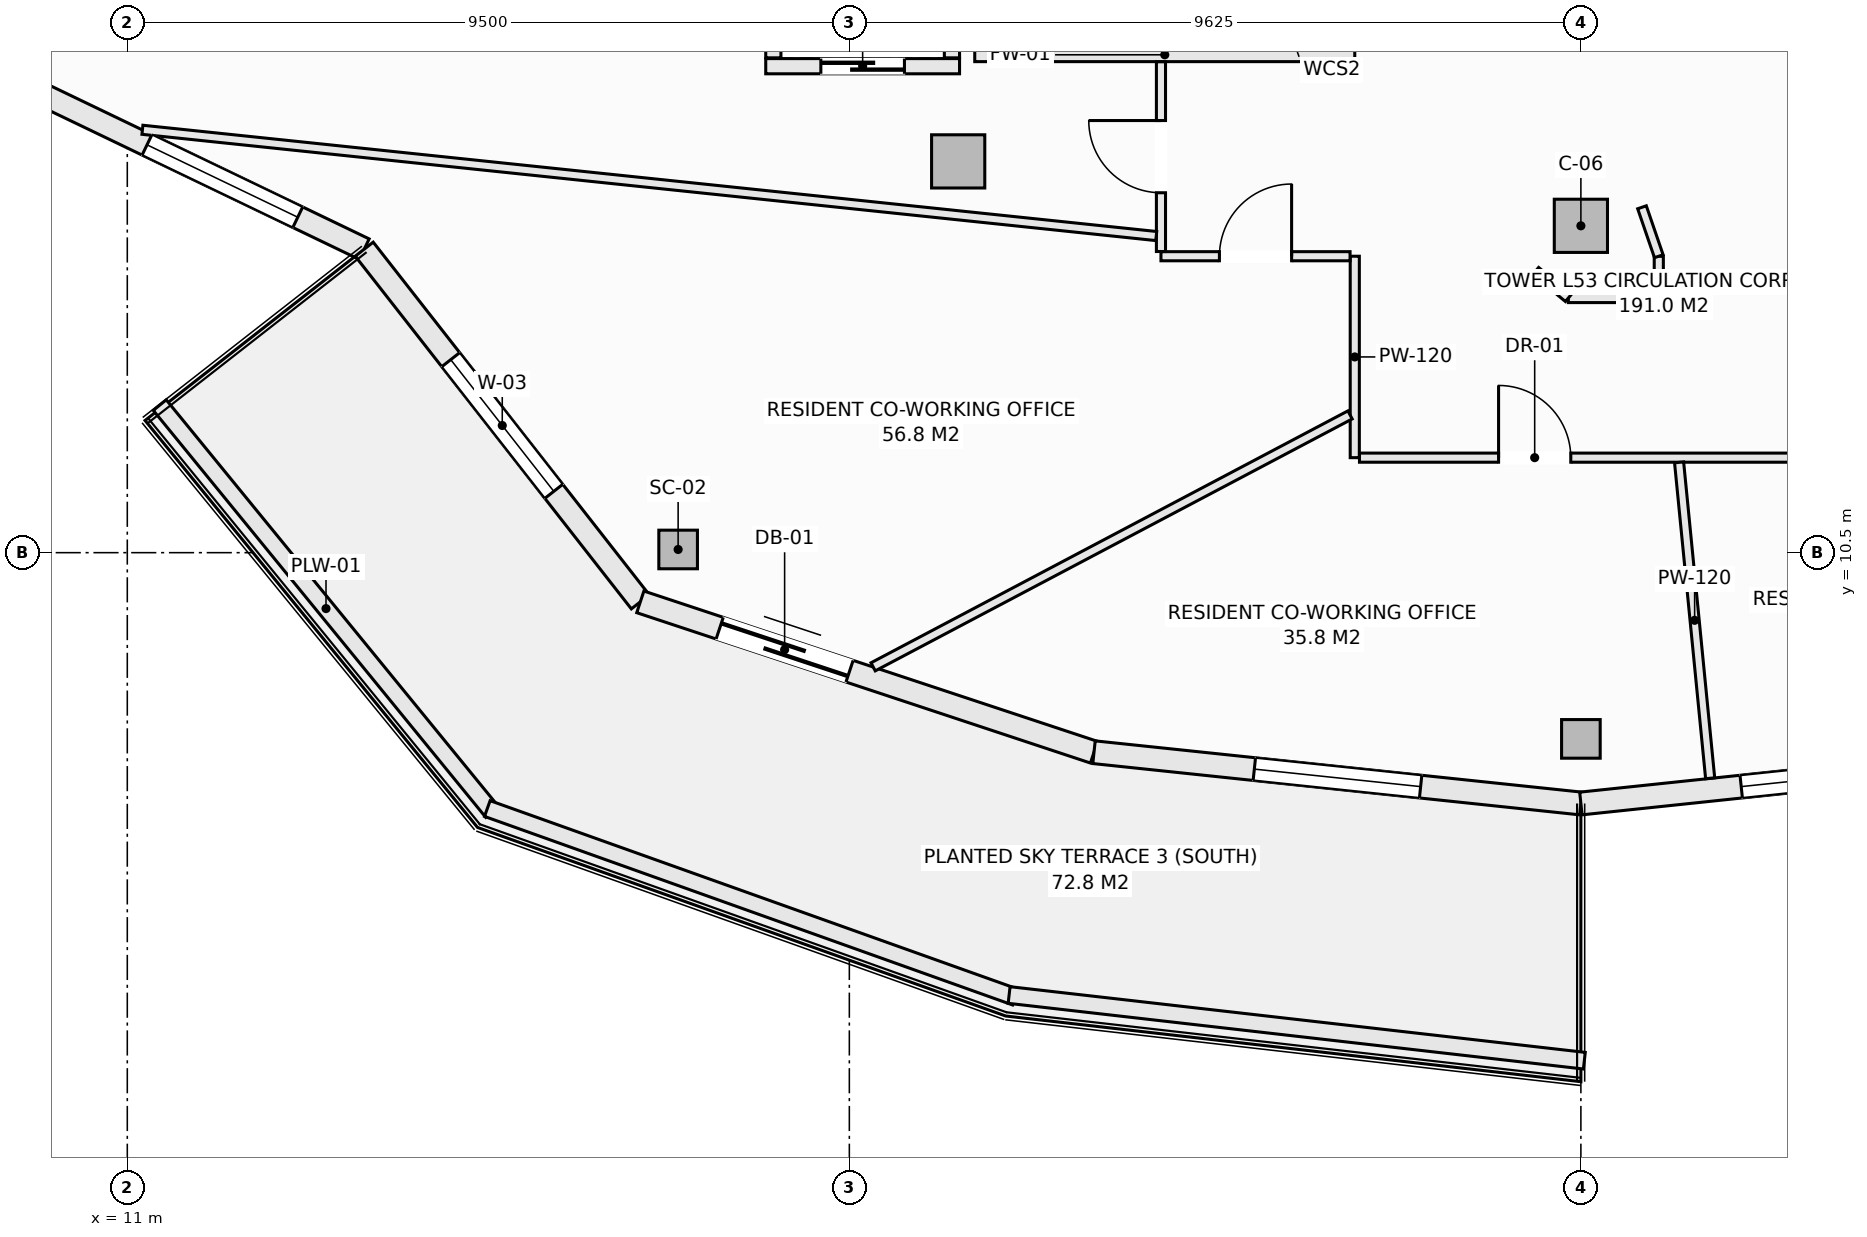
"""IFC4 building model, lengths in metres.
Left out: names, types, materials, properties, quantities, classifications, styles, units other than length and angle.
Written with IfcOpenShell. Run it as: python <this file> out.ifc"""

import sys

from ifc_helpers import new_model, si_unit, direction, frame, frame_2d, origin, origin_2d, place, context, subcontext, project, spatial, rectangle, hollow_rectangle, extrude, element, fill, save


model = new_model("IFC4")
c1 = context("Model", 3, precision=1e-05, world=origin(), true_north=direction((0.0, 1.0)))
c2 = subcontext(c1, "Body", "Model", "MODEL_VIEW")
j1 = project(units=[si_unit("LENGTHUNIT", "METRE"), si_unit("PLANEANGLEUNIT", "RADIAN")], contexts=[c1])
p1 = place(None, origin())
s1 = spatial("IfcSite", under=j1, at=p1, CompositionType="ELEMENT")
p2 = place(p1, origin())
s2 = spatial("IfcBuilding", under=s1, at=p2, CompositionType="ELEMENT")
p3 = place(p2, frame((0.0, 0.0, 203.0)))
s3 = spatial("IfcBuildingStorey", under=s2, at=p3, CompositionType="ELEMENT", Elevation=203.0)
for number, where, z_axis, x_axis in (
    (1, (18.247, 10.542, -0.27), (0.0, 0.0, 1.0), (1.0, 0.0, 0.0)),
    (2, (30.125, 8.05, -0.27), (0.0, 0.0, 1.0), (1.0, 0.0, 0.0)),
):
    element("IfcColumn", number, at=place(p3, frame(where, z_axis=z_axis, x_axis=x_axis)), inside=s3, PredefinedType="COLUMN", context=c2, shape_type="SweptSolid", body=[
        extrude(hollow_rectangle(XDim=0.508, YDim=0.508, WallThickness=0.019, at=origin_2d()), origin(), (0.0, 0.0, 1.0), 3.3),
    ])
for number, where, z_axis, x_axis in (
    (3, (21.932, 15.648, -0.27), (0.0, 0.0, 1.0), (1.0, 0.0, 0.0)),
    (4, (30.125, 14.8, -0.27), (0.0, 0.0, 1.0), (1.0, 0.0, 0.0)),
):
    element("IfcColumn", number, at=place(p3, frame(where, z_axis=z_axis, x_axis=x_axis)), inside=s3, PredefinedType="COLUMN", context=c2, shape_type="SweptSolid", body=[
        extrude(rectangle(XDim=0.7, YDim=0.7, at=origin_2d()), origin(), (0.0, 0.0, 1.0), 3.3),
    ])
p4 = place(p3, frame((8.691, 17.1, 0.0), z_axis=(0.0, 0.0, 1.0), x_axis=(0.901348331142, -0.433094892545, 0.0)))
e5 = element("IfcWall", 5, at=p4, inside=s3, PredefinedType="SOLIDWALL", context=c2, shape_type="SweptSolid", body=[
    extrude(rectangle(XDim=6.021, YDim=0.3, at=frame_2d((3.01, 0.0))), origin(), (0.0, 0.0, 1.0), 2.605),
])
p5 = place(p4, frame((2.85, 0.0, 0.72)))
e6 = element("IfcOpeningElement", 6, at=p5, cuts=e5, PredefinedType="OPENING", context=c2, shape_type="SweptSolid", body=[
    extrude(rectangle(XDim=2.2, YDim=1.65, at=frame_2d((1.1, 0.825))), frame((0.0, 0.16, 0.0), z_axis=(0.0, -1.0, 0.0), x_axis=(1.0, 0.0, 0.0)), (0.0, 0.0, 1.0), 0.32),
])
p6 = place(p3, frame((14.117, 14.493, 0.0), z_axis=(0.0, 0.0, 1.0), x_axis=(0.616450126935, -0.787393955401, 0.0)))
e7 = element("IfcWall", 7, at=p6, inside=s3, PredefinedType="SOLIDWALL", context=c2, shape_type="SweptSolid", body=[
    extrude(rectangle(XDim=5.893, YDim=0.3, at=frame_2d((2.946, 0.0))), origin(), (0.0, 0.0, 1.0), 2.605),
])
p7 = place(p6, frame((1.846, 0.0, 0.72)))
e8 = element("IfcOpeningElement", 8, at=p7, cuts=e7, PredefinedType="OPENING", context=c2, shape_type="SweptSolid", body=[
    extrude(rectangle(XDim=2.2, YDim=1.65, at=frame_2d((1.1, 0.825))), frame((0.0, 0.16, 0.0), z_axis=(0.0, -1.0, 0.0), x_axis=(1.0, 0.0, 0.0)), (0.0, 0.0, 1.0), 0.32),
])
p8 = place(p3, frame((17.75, 9.853, 0.0), z_axis=(0.0, 0.0, 1.0), x_axis=(0.949240877604, -0.314550085495, 0.0)))
e9 = element("IfcWall", 9, at=p8, inside=s3, PredefinedType="SOLIDWALL", context=c2, shape_type="SweptSolid", body=[
    extrude(rectangle(XDim=6.288, YDim=0.3, at=frame_2d((3.144, 0.0))), origin(), (0.0, 0.0, 1.0), 2.605),
])
p9 = place(p8, frame((1.1, 0.0, 0.0)))
e10 = element("IfcOpeningElement", 10, at=p9, cuts=e9, PredefinedType="OPENING", context=c2, shape_type="SweptSolid", body=[
    extrude(rectangle(XDim=1.8, YDim=2.25, at=frame_2d((0.9, 1.125))), frame((0.0, 0.16, 0.0), z_axis=(0.0, -1.0, 0.0), x_axis=(1.0, 0.0, 0.0)), (0.0, 0.0, 1.0), 0.32),
])
p10 = place(p3, frame((23.719, 7.875, 0.0), z_axis=(0.0, 0.0, 1.0), x_axis=(0.994497142298, -0.104763705363, 0.0)))
e11 = element("IfcWall", 11, at=p10, inside=s3, PredefinedType="SOLIDWALL", context=c2, shape_type="SweptSolid", body=[
    extrude(rectangle(XDim=6.441, YDim=0.3, at=frame_2d((3.221, 0.0))), origin(), (0.0, 0.0, 1.0), 2.605),
])
p11 = place(p10, frame((2.121, 0.0, 0.72)))
e12 = element("IfcOpeningElement", 12, at=p11, cuts=e11, PredefinedType="OPENING", context=c2, shape_type="SweptSolid", body=[
    extrude(rectangle(XDim=2.2, YDim=1.65, at=frame_2d((1.1, 0.825))), frame((0.0, 0.16, 0.0), z_axis=(0.0, -1.0, 0.0), x_axis=(1.0, 0.0, 0.0)), (0.0, 0.0, 1.0), 0.32),
])
p12 = place(p3, frame((30.125, 7.2, 0.0), z_axis=(0.0, 0.0, 1.0), x_axis=(0.994497142298, 0.104763705363, 0.0)))
e13 = element("IfcWall", 13, at=p12, inside=s3, PredefinedType="SOLIDWALL", context=c2, shape_type="SweptSolid", body=[
    extrude(rectangle(XDim=6.441, YDim=0.3, at=frame_2d((3.221, 0.0))), origin(), (0.0, 0.0, 1.0), 2.605),
])
p13 = place(p12, frame((2.121, 0.0, 0.72)))
e14 = element("IfcOpeningElement", 14, at=p13, cuts=e13, PredefinedType="OPENING", context=c2, shape_type="SweptSolid", body=[
    extrude(rectangle(XDim=2.2, YDim=1.65, at=frame_2d((1.1, 0.825))), frame((0.0, 0.16, 0.0), z_axis=(0.0, -1.0, 0.0), x_axis=(1.0, 0.0, 0.0)), (0.0, 0.0, 1.0), 0.32),
])
p14 = place(p3, frame((11.427, 12.441, 0.0), z_axis=(0.0, 0.0, 1.0), x_axis=(0.632697312147, -0.774399193699, 0.0)))
e15 = element("IfcWall", 15, at=p14, inside=s3, PredefinedType="PARAPET", context=c2, shape_type="SweptSolid", body=[
    extrude(rectangle(XDim=6.914, YDim=0.22, at=frame_2d((3.457, 0.0))), origin(), (0.0, 0.0, 1.0), 0.52),
])
p15 = place(p3, frame((15.737, 7.134, 0.0), z_axis=(0.0, 0.0, 1.0), x_axis=(0.941780086523, -0.336229488042, 0.0)))
e16 = element("IfcWall", 16, at=p15, inside=s3, PredefinedType="PARAPET", context=c2, shape_type="SweptSolid", body=[
    extrude(rectangle(XDim=7.378, YDim=0.22, at=frame_2d((3.689, 0.0))), origin(), (0.0, 0.0, 1.0), 0.52),
])
p16 = place(p3, frame((22.602, 4.68, 0.0), z_axis=(0.0, 0.0, 1.0), x_axis=(0.993546198781, -0.113428175021, 0.0)))
e17 = element("IfcWall", 17, at=p16, inside=s3, PredefinedType="PARAPET", context=c2, shape_type="SweptSolid", body=[
    extrude(rectangle(XDim=7.617, YDim=0.22, at=frame_2d((3.809, 0.0))), origin(), (0.0, 0.0, 1.0), 0.52),
])
p17 = place(p3, frame((19.4, 16.9, 0.0), z_axis=(0.0, 0.0, 1.0), x_axis=(1.0, 0.0, 0.0)))
e18 = element("IfcWall", 18, at=p17, inside=s3, PredefinedType="SOLIDWALL", context=c2, shape_type="SweptSolid", body=[
    extrude(rectangle(XDim=2.55, YDim=0.2, at=frame_2d((1.275, 0.0))), origin(), (0.0, 0.0, 1.0), 3.03),
])
p18 = place(p17, frame((0.725, 0.0, 0.0)))
e19 = element("IfcOpeningElement", 19, at=p18, cuts=e18, PredefinedType="OPENING", context=c2, shape_type="SweptSolid", body=[
    extrude(rectangle(XDim=1.1, YDim=2.2, at=frame_2d((0.55, 1.1))), frame((0.0, 0.11, 0.0), z_axis=(0.0, -1.0, 0.0), x_axis=(1.0, 0.0, 0.0)), (0.0, 0.0, 1.0), 0.22),
])
for number, where, z_axis, x_axis in (
    (20, (19.5, 17.01, 0.0), (0.0, 0.0, 1.0), (0.0, 1.0, 0.0)),
    (21, (21.85, 17.01, 0.0), (0.0, 0.0, 1.0), (0.0, 1.0, 0.0)),
):
    element("IfcWall", number, at=place(p3, frame(where, z_axis=z_axis, x_axis=x_axis)), inside=s3, PredefinedType="SOLIDWALL", context=c2, shape_type="SweptSolid", body=[
        extrude(rectangle(XDim=2.53, YDim=0.2, at=frame_2d((1.265, 0.0))), origin(), (0.0, 0.0, 1.0), 3.03),
    ])
p19 = place(p3, frame((22.15, 17.05, 0.0), z_axis=(0.0, 0.0, 1.0), x_axis=(1.0, 0.0, 0.0)))
e22 = element("IfcWall", 22, at=p19, inside=s3, PredefinedType="SOLIDWALL", context=c2, shape_type="SweptSolid", body=[
    extrude(rectangle(XDim=5.0, YDim=0.18, at=frame_2d((2.5, 0.0))), origin(), (0.0, 0.0, 1.0), 3.03),
])
p20 = place(p3, frame((27.15, 11.75, 0.0), z_axis=(0.0, 0.0, 1.0), x_axis=(0.0, 1.0, 0.0)))
e23 = element("IfcWall", 23, at=p20, inside=s3, PredefinedType="PARTITIONING", context=c2, shape_type="SweptSolid", body=[
    extrude(rectangle(XDim=2.65, YDim=0.12, at=frame_2d((1.325, 0.0))), origin(), (0.0, 0.0, 1.0), 3.03),
])
p21 = place(p3, frame((24.6, 14.4, 0.0), z_axis=(0.0, 0.0, 1.0), x_axis=(1.0, 0.0, 0.0)))
e24 = element("IfcWall", 24, at=p21, inside=s3, PredefinedType="PARTITIONING", context=c2, shape_type="SweptSolid", body=[
    extrude(rectangle(XDim=2.488, YDim=0.12, at=frame_2d((1.244, 0.0))), origin(), (0.0, 0.0, 1.0), 3.03),
])
p22 = place(p21, frame((0.769, 0.0, 0.0)))
e25 = element("IfcOpeningElement", 25, at=p22, cuts=e24, PredefinedType="OPENING", context=c2, shape_type="SweptSolid", body=[
    extrude(rectangle(XDim=0.95, YDim=2.1, at=frame_2d((0.475, 1.05))), frame((0.0, 0.07, 0.0), z_axis=(0.0, -1.0, 0.0), x_axis=(1.0, 0.0, 0.0)), (0.0, 0.0, 1.0), 0.14),
])
p23 = place(p3, frame((27.212, 11.75, 0.0), z_axis=(0.0, 0.0, 1.0), x_axis=(1.0, 0.0, 0.0)))
e26 = element("IfcWall", 26, at=p23, inside=s3, PredefinedType="PARTITIONING", context=c2, shape_type="SweptSolid", body=[
    extrude(rectangle(XDim=8.676, YDim=0.12, at=frame_2d((4.338, 0.0))), origin(), (0.0, 0.0, 1.0), 3.03),
])
p24 = place(p23, frame((1.83, 0.0, 0.0)))
e27 = element("IfcOpeningElement", 27, at=p24, cuts=e26, PredefinedType="OPENING", context=c2, shape_type="SweptSolid", body=[
    extrude(rectangle(XDim=0.95, YDim=2.1, at=frame_2d((0.475, 1.05))), frame((0.0, 0.07, 0.0), z_axis=(0.0, -1.0, 0.0), x_axis=(1.0, 0.0, 0.0)), (0.0, 0.0, 1.0), 0.14),
])
p25 = place(p23, frame((5.757, 0.0, 0.0)))
e28 = element("IfcOpeningElement", 28, at=p25, cuts=e26, PredefinedType="OPENING", context=c2, shape_type="SweptSolid", body=[
    extrude(rectangle(XDim=0.95, YDim=2.1, at=frame_2d((0.475, 1.05))), frame((0.0, 0.07, 0.0), z_axis=(0.0, -1.0, 0.0), x_axis=(1.0, 0.0, 0.0)), (0.0, 0.0, 1.0), 0.14),
])
p26 = place(p3, frame((24.6, 14.462, 0.0), z_axis=(0.0, 0.0, 1.0), x_axis=(0.0, 1.0, 0.0)))
e29 = element("IfcWall", 29, at=p26, inside=s3, PredefinedType="PARTITIONING", context=c2, shape_type="SweptSolid", body=[
    extrude(rectangle(XDim=2.496, YDim=0.12, at=frame_2d((1.248, 0.0))), origin(), (0.0, 0.0, 1.0), 3.03),
])
p27 = place(p26, frame((0.773, 0.0, 0.0)))
e30 = element("IfcOpeningElement", 30, at=p27, cuts=e29, PredefinedType="OPENING", context=c2, shape_type="SweptSolid", body=[
    extrude(rectangle(XDim=0.95, YDim=2.1, at=frame_2d((0.475, 1.05))), frame((0.0, 0.07, 0.0), z_axis=(0.0, -1.0, 0.0), x_axis=(1.0, 0.0, 0.0)), (0.0, 0.0, 1.0), 0.14),
])
p28 = place(p3, frame((29.96, 13.85, 0.0), z_axis=(0.0, 0.0, 1.0), x_axis=(1.0, 0.0, 0.0)))
e31 = element("IfcWall", 31, at=p28, inside=s3, PredefinedType="PARTITIONING", context=c2, shape_type="SweptSolid", body=[
    extrude(rectangle(XDim=1.19, YDim=0.12, at=frame_2d((0.595, 0.0))), origin(), (0.0, 0.0, 1.0), 3.03),
])
p29 = place(p3, frame((31.15, 13.912, 0.0), z_axis=(0.0, 0.0, 1.0), x_axis=(0.0, 1.0, 0.0)))
e32 = element("IfcWall", 32, at=p29, inside=s3, PredefinedType="PARTITIONING", context=c2, shape_type="SweptSolid", body=[
    extrude(rectangle(XDim=0.488, YDim=0.12, at=frame_2d((0.244, 0.0))), origin(), (0.0, 0.0, 1.0), 3.03),
])
p30 = place(p3, frame((30.929, 15.044, 0.0), z_axis=(0.0, 0.0, 1.0), x_axis=(0.324498492416, -0.945886213252, 0.0)))
e33 = element("IfcWall", 33, at=p30, inside=s3, PredefinedType="PARTITIONING", context=c2, shape_type="SweptSolid", body=[
    extrude(rectangle(XDim=0.681, YDim=0.12, at=frame_2d((0.34, 0.0))), origin(), (0.0, 0.0, 1.0), 3.03),
])
p31 = place(p3, frame((29.531, 14.206, 0.0), z_axis=(0.0, 0.0, 1.0), x_axis=(0.7695479554, -0.638589026166, 0.0)))
e34 = element("IfcWall", 34, at=p31, inside=s3, PredefinedType="PARTITIONING", context=c2, shape_type="SweptSolid", body=[
    extrude(rectangle(XDim=0.557, YDim=0.12, at=frame_2d((0.279, 0.0))), origin(), (0.0, 0.0, 1.0), 3.03),
])
p32 = place(p3, frame((11.199, 16.063, 0.0), z_axis=(0.0, 0.0, 1.0), x_axis=(0.994553027345, -0.104231836785, 0.0)))
e35 = element("IfcWall", 35, at=p32, inside=s3, PredefinedType="PARTITIONING", context=c2, shape_type="SweptSolid", body=[
    extrude(rectangle(XDim=13.412, YDim=0.12, at=frame_2d((6.706, 0.0))), origin(), (0.0, 0.0, 1.0), 2.605),
])
p33 = place(p3, frame((20.813, 8.998, 0.0), z_axis=(0.0, 0.0, 1.0), x_axis=(0.884227698582, 0.467056074856, 0.0)))
e36 = element("IfcWall", 36, at=p33, inside=s3, PredefinedType="PARTITIONING", context=c2, shape_type="SweptSolid", body=[
    extrude(rectangle(XDim=7.096, YDim=0.12, at=frame_2d((3.548, 0.0))), origin(), (0.0, 0.0, 1.0), 3.03),
])
p34 = place(p3, frame((31.417, 11.688, 0.0), z_axis=(0.0, 0.0, 1.0), x_axis=(0.097923390467, -0.995193955769, 0.0)))
e37 = element("IfcWall", 37, at=p34, inside=s3, PredefinedType="PARTITIONING", context=c2, shape_type="SweptSolid", body=[
    extrude(rectangle(XDim=4.176, YDim=0.12, at=frame_2d((2.088, 0.0))), origin(), (0.0, 0.0, 1.0), 3.03),
])
p35 = place(p5, origin())
e38 = element("IfcWindow", 38, at=p35, inside=s3, PartitioningType="SINGLE_PANEL", PredefinedType="WINDOW", context=c2, shape_type="SweptSolid", body=[
    extrude(rectangle(XDim=2.2, YDim=1.65, at=frame_2d((1.1, 0.825))), frame((0.0, 0.03, 0.0), z_axis=(0.0, -1.0, 0.0), x_axis=(1.0, 0.0, 0.0)), (0.0, 0.0, 1.0), 0.06),
])
fill(e6, e38)
p36 = place(p7, origin())
e39 = element("IfcWindow", 39, at=p36, inside=s3, PartitioningType="SINGLE_PANEL", PredefinedType="WINDOW", context=c2, shape_type="SweptSolid", body=[
    extrude(rectangle(XDim=2.2, YDim=1.65, at=frame_2d((1.1, 0.825))), frame((0.0, 0.03, 0.0), z_axis=(0.0, -1.0, 0.0), x_axis=(1.0, 0.0, 0.0)), (0.0, 0.0, 1.0), 0.06),
])
fill(e8, e39)
p37 = place(p9, frame((1.8, 0.0, 0.0), z_axis=(0.0, 0.0, 1.0), x_axis=(-1.0, 0.0, 0.0)))
e40 = element("IfcDoor", 40, at=p37, inside=s3, OperationType="SLIDING_TO_LEFT", PredefinedType="DOOR", context=c2, shape_type="SweptSolid", body=[
    extrude(rectangle(XDim=1.8, YDim=2.25, at=frame_2d((0.9, 1.125))), frame((0.0, 0.025, 0.0), z_axis=(0.0, -1.0, 0.0), x_axis=(1.0, 0.0, 0.0)), (0.0, 0.0, 1.0), 0.05),
])
fill(e10, e40)
p38 = place(p11, origin())
e41 = element("IfcWindow", 41, at=p38, inside=s3, PartitioningType="SINGLE_PANEL", PredefinedType="WINDOW", context=c2, shape_type="SweptSolid", body=[
    extrude(rectangle(XDim=2.2, YDim=1.65, at=frame_2d((1.1, 0.825))), frame((0.0, 0.03, 0.0), z_axis=(0.0, -1.0, 0.0), x_axis=(1.0, 0.0, 0.0)), (0.0, 0.0, 1.0), 0.06),
])
fill(e12, e41)
p39 = place(p13, origin())
e42 = element("IfcWindow", 42, at=p39, inside=s3, PartitioningType="SINGLE_PANEL", PredefinedType="WINDOW", context=c2, shape_type="SweptSolid", body=[
    extrude(rectangle(XDim=2.2, YDim=1.65, at=frame_2d((1.1, 0.825))), frame((0.0, 0.03, 0.0), z_axis=(0.0, -1.0, 0.0), x_axis=(1.0, 0.0, 0.0)), (0.0, 0.0, 1.0), 0.06),
])
fill(e14, e42)
p40 = place(p18, origin())
e43 = element("IfcDoor", 43, at=p40, inside=s3, OperationType="SLIDING_TO_LEFT", PredefinedType="DOOR", context=c2, shape_type="SweptSolid", body=[
    extrude(rectangle(XDim=1.1, YDim=2.2, at=frame_2d((0.55, 1.1))), frame((0.0, 0.025, 0.0), z_axis=(0.0, -1.0, 0.0), x_axis=(1.0, 0.0, 0.0)), (0.0, 0.0, 1.0), 0.05),
])
fill(e19, e43)
p41 = place(p22, origin())
e44 = element("IfcDoor", 44, at=p41, inside=s3, OperationType="SINGLE_SWING_RIGHT", PredefinedType="DOOR", context=c2, shape_type="SweptSolid", body=[
    extrude(rectangle(XDim=0.95, YDim=2.1, at=frame_2d((0.475, 1.05))), frame((0.0, 0.025, 0.0), z_axis=(0.0, -1.0, 0.0), x_axis=(1.0, 0.0, 0.0)), (0.0, 0.0, 1.0), 0.05),
])
fill(e25, e44)
p42 = place(p24, origin())
e45 = element("IfcDoor", 45, at=p42, inside=s3, OperationType="SINGLE_SWING_LEFT", PredefinedType="DOOR", context=c2, shape_type="SweptSolid", body=[
    extrude(rectangle(XDim=0.95, YDim=2.1, at=frame_2d((0.475, 1.05))), frame((0.0, 0.025, 0.0), z_axis=(0.0, -1.0, 0.0), x_axis=(1.0, 0.0, 0.0)), (0.0, 0.0, 1.0), 0.05),
])
fill(e27, e45)
p43 = place(p27, origin())
e46 = element("IfcDoor", 46, at=p43, inside=s3, OperationType="SINGLE_SWING_RIGHT", PredefinedType="DOOR", context=c2, shape_type="SweptSolid", body=[
    extrude(rectangle(XDim=0.95, YDim=2.1, at=frame_2d((0.475, 1.05))), frame((0.0, 0.025, 0.0), z_axis=(0.0, -1.0, 0.0), x_axis=(1.0, 0.0, 0.0)), (0.0, 0.0, 1.0), 0.05),
])
fill(e30, e46)
save(model, sys.argv[1])
